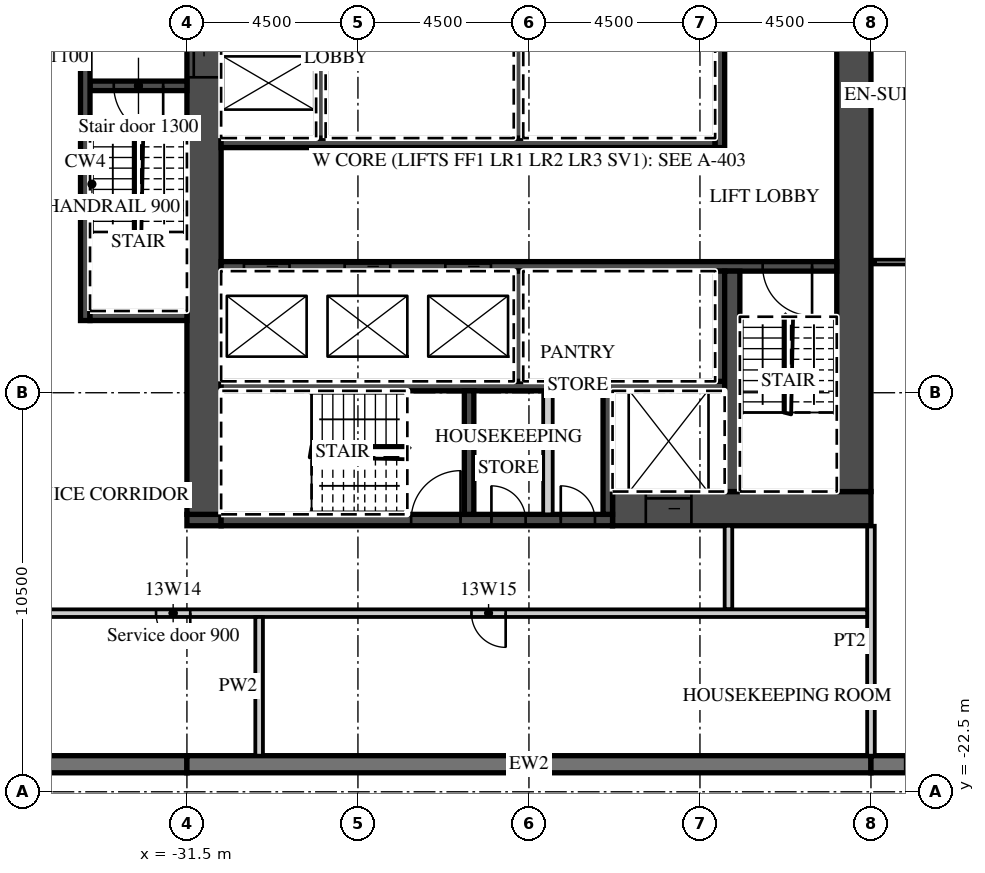
"""IFC4 building model, lengths in metres.
Left out: names, types, materials, properties, quantities, classifications, styles, units other than length and angle.
Written with IfcOpenShell. Run it as: python <this file> out.ifc"""

import sys

from ifc_helpers import new_model, si_unit, direction, frame, frame_2d, origin, place, context, subcontext, project, spatial, rectangle, extrude, element, fill, save


model = new_model("IFC4")
c1 = context("Model", 3, precision=1e-05, world=origin(), true_north=direction((0.0, 1.0)))
c2 = subcontext(c1, "Body", "Model", "MODEL_VIEW")
j1 = project(units=[si_unit("LENGTHUNIT", "METRE"), si_unit("PLANEANGLEUNIT", "RADIAN")], contexts=[c1])
p1 = place(None, origin())
s1 = spatial("IfcSite", under=j1, at=p1, CompositionType="ELEMENT")
p2 = place(p1, origin())
s2 = spatial("IfcBuilding", under=s1, at=p2, CompositionType="ELEMENT")
p3 = place(p2, frame((0.0, 0.0, 73.2)))
s3 = spatial("IfcBuildingStorey", under=s2, at=p3, CompositionType="ELEMENT", Elevation=73.2)
p4 = place(p3, frame((-41.0, -21.775, 0.0), z_axis=(0.0, 0.0, 1.0), x_axis=(1.0, 0.0, 0.0)))
e1 = element("IfcWall", 1, at=p4, inside=s3, PredefinedType="SOLIDWALL", context=c2, shape_type="SweptSolid", body=[
    extrude(rectangle(XDim=9.5, YDim=0.45, at=frame_2d((4.75, 0.0))), origin(), (0.0, 0.0, 1.0), 3.02),
])
p5 = place(p3, frame((-31.5, -21.775, 0.0), z_axis=(0.0, 0.0, 1.0), x_axis=(1.0, 0.0, 0.0)))
e2 = element("IfcWall", 2, at=p5, inside=s3, PredefinedType="SOLIDWALL", context=c2, shape_type="SweptSolid", body=[
    extrude(rectangle(XDim=18.0, YDim=0.45, at=frame_2d((9.0, 0.0))), origin(), (0.0, 0.0, 1.0), 3.02),
])
p6 = place(p3, frame((-13.5, -21.775, 0.0), z_axis=(0.0, 0.0, 1.0), x_axis=(1.0, 0.0, 0.0)))
e3 = element("IfcWall", 3, at=p6, inside=s3, PredefinedType="SOLIDWALL", context=c2, shape_type="SweptSolid", body=[
    extrude(rectangle(XDim=54.5, YDim=0.45, at=frame_2d((27.25, 0.0))), origin(), (0.0, 0.0, 1.0), 3.02),
])
p7 = place(p6, frame((0.9, 0.0, 0.45)))
e4 = element("IfcOpeningElement", 4, at=p7, cuts=e3, PredefinedType="OPENING", context=c2, shape_type="SweptSolid", body=[
    extrude(rectangle(XDim=2.7, YDim=2.25, at=frame_2d((1.35, 1.125))), frame((0.0, 0.235, 0.0), z_axis=(0.0, -1.0, 0.0), x_axis=(1.0, 0.0, 0.0)), (0.0, 0.0, 1.0), 0.47),
])
p8 = place(p6, frame((5.4, 0.0, 0.45)))
e5 = element("IfcOpeningElement", 5, at=p8, cuts=e3, PredefinedType="OPENING", context=c2, shape_type="SweptSolid", body=[
    extrude(rectangle(XDim=2.7, YDim=2.25, at=frame_2d((1.35, 1.125))), frame((0.0, 0.235, 0.0), z_axis=(0.0, -1.0, 0.0), x_axis=(1.0, 0.0, 0.0)), (0.0, 0.0, 1.0), 0.47),
])
p9 = place(p6, frame((9.9, 0.0, 0.45)))
e6 = element("IfcOpeningElement", 6, at=p9, cuts=e3, PredefinedType="OPENING", context=c2, shape_type="SweptSolid", body=[
    extrude(rectangle(XDim=2.7, YDim=2.25, at=frame_2d((1.35, 1.125))), frame((0.0, 0.235, 0.0), z_axis=(0.0, -1.0, 0.0), x_axis=(1.0, 0.0, 0.0)), (0.0, 0.0, 1.0), 0.47),
])
p10 = place(p6, frame((14.4, 0.0, 0.45)))
e7 = element("IfcOpeningElement", 7, at=p10, cuts=e3, PredefinedType="OPENING", context=c2, shape_type="SweptSolid", body=[
    extrude(rectangle(XDim=2.7, YDim=2.25, at=frame_2d((1.35, 1.125))), frame((0.0, 0.235, 0.0), z_axis=(0.0, -1.0, 0.0), x_axis=(1.0, 0.0, 0.0)), (0.0, 0.0, 1.0), 0.47),
])
p11 = place(p6, frame((18.9, 0.0, 0.45)))
e8 = element("IfcOpeningElement", 8, at=p11, cuts=e3, PredefinedType="OPENING", context=c2, shape_type="SweptSolid", body=[
    extrude(rectangle(XDim=2.7, YDim=2.25, at=frame_2d((1.35, 1.125))), frame((0.0, 0.235, 0.0), z_axis=(0.0, -1.0, 0.0), x_axis=(1.0, 0.0, 0.0)), (0.0, 0.0, 1.0), 0.47),
])
p12 = place(p6, frame((23.4, 0.0, 0.45)))
e9 = element("IfcOpeningElement", 9, at=p12, cuts=e3, PredefinedType="OPENING", context=c2, shape_type="SweptSolid", body=[
    extrude(rectangle(XDim=2.7, YDim=2.25, at=frame_2d((1.35, 1.125))), frame((0.0, 0.235, 0.0), z_axis=(0.0, -1.0, 0.0), x_axis=(1.0, 0.0, 0.0)), (0.0, 0.0, 1.0), 0.47),
])
p13 = place(p6, frame((27.9, 0.0, 0.45)))
e10 = element("IfcOpeningElement", 10, at=p13, cuts=e3, PredefinedType="OPENING", context=c2, shape_type="SweptSolid", body=[
    extrude(rectangle(XDim=2.7, YDim=2.25, at=frame_2d((1.35, 1.125))), frame((0.0, 0.235, 0.0), z_axis=(0.0, -1.0, 0.0), x_axis=(1.0, 0.0, 0.0)), (0.0, 0.0, 1.0), 0.47),
])
p14 = place(p6, frame((32.4, 0.0, 0.45)))
e11 = element("IfcOpeningElement", 11, at=p14, cuts=e3, PredefinedType="OPENING", context=c2, shape_type="SweptSolid", body=[
    extrude(rectangle(XDim=2.7, YDim=2.25, at=frame_2d((1.35, 1.125))), frame((0.0, 0.235, 0.0), z_axis=(0.0, -1.0, 0.0), x_axis=(1.0, 0.0, 0.0)), (0.0, 0.0, 1.0), 0.47),
])
p15 = place(p6, frame((36.9, 0.0, 0.45)))
e12 = element("IfcOpeningElement", 12, at=p15, cuts=e3, PredefinedType="OPENING", context=c2, shape_type="SweptSolid", body=[
    extrude(rectangle(XDim=2.7, YDim=2.25, at=frame_2d((1.35, 1.125))), frame((0.0, 0.235, 0.0), z_axis=(0.0, -1.0, 0.0), x_axis=(1.0, 0.0, 0.0)), (0.0, 0.0, 1.0), 0.47),
])
p16 = place(p6, frame((41.4, 0.0, 0.45)))
e13 = element("IfcOpeningElement", 13, at=p16, cuts=e3, PredefinedType="OPENING", context=c2, shape_type="SweptSolid", body=[
    extrude(rectangle(XDim=2.7, YDim=2.25, at=frame_2d((1.35, 1.125))), frame((0.0, 0.235, 0.0), z_axis=(0.0, -1.0, 0.0), x_axis=(1.0, 0.0, 0.0)), (0.0, 0.0, 1.0), 0.47),
])
p17 = place(p6, frame((45.9, 0.0, 0.45)))
e14 = element("IfcOpeningElement", 14, at=p17, cuts=e3, PredefinedType="OPENING", context=c2, shape_type="SweptSolid", body=[
    extrude(rectangle(XDim=2.7, YDim=2.25, at=frame_2d((1.35, 1.125))), frame((0.0, 0.235, 0.0), z_axis=(0.0, -1.0, 0.0), x_axis=(1.0, 0.0, 0.0)), (0.0, 0.0, 1.0), 0.47),
])
p18 = place(p6, frame((50.4, 0.0, 0.45)))
e15 = element("IfcOpeningElement", 15, at=p18, cuts=e3, PredefinedType="OPENING", context=c2, shape_type="SweptSolid", body=[
    extrude(rectangle(XDim=2.7, YDim=2.25, at=frame_2d((1.35, 1.125))), frame((0.0, 0.235, 0.0), z_axis=(0.0, -1.0, 0.0), x_axis=(1.0, 0.0, 0.0)), (0.0, 0.0, 1.0), 0.47),
])
p19 = place(p3, frame((-13.5, -21.55, 0.0), z_axis=(0.0, 0.0, 1.0), x_axis=(0.0, 1.0, 0.0)))
e16 = element("IfcWall", 16, at=p19, inside=s3, PredefinedType="PARTITIONING", context=c2, shape_type="SweptSolid", body=[
    extrude(rectangle(XDim=6.05, YDim=0.2, at=frame_2d((3.025, 0.0))), origin(), (0.0, 0.0, 1.0), 3.02),
])
p20 = place(p3, frame((-13.4, -8.562, 0.0), z_axis=(0.0, 0.0, 1.0), x_axis=(1.0, 0.0, 0.0)))
e17 = element("IfcWall", 17, at=p20, inside=s3, PredefinedType="PARTITIONING", context=c2, shape_type="SweptSolid", body=[
    extrude(rectangle(XDim=2.25, YDim=0.125, at=frame_2d((1.125, 0.0))), origin(), (0.0, 0.0, 1.0), 3.02),
])
p21 = place(p3, frame((-20.3, -15.05, 0.0), z_axis=(0.0, 0.0, 1.0), x_axis=(1.0, 0.0, 0.0)))
e18 = element("IfcWall", 18, at=p21, inside=s3, PredefinedType="SHEAR", context=c2, shape_type="SweptSolid", body=[
    extrude(rectangle(XDim=6.8, YDim=0.9, at=frame_2d((3.4, 0.0))), origin(), (0.0, 0.0, 1.0), 3.02),
])
p22 = place(p21, frame((0.875, 0.0, 0.0)))
e19 = element("IfcOpeningElement", 19, at=p22, cuts=e18, PredefinedType="OPENING", context=c2, shape_type="SweptSolid", body=[
    extrude(rectangle(XDim=1.2, YDim=2.1, at=frame_2d((0.6, 1.05))), frame((0.0, 0.46, 0.0), z_axis=(0.0, -1.0, 0.0), x_axis=(1.0, 0.0, 0.0)), (0.0, 0.0, 1.0), 0.92),
])
p23 = place(p3, frame((-31.5, -15.35, 0.0), z_axis=(0.0, 0.0, 1.0), x_axis=(1.0, 0.0, 0.0)))
e20 = element("IfcWall", 20, at=p23, inside=s3, PredefinedType="SHEAR", context=c2, shape_type="SweptSolid", body=[
    extrude(rectangle(XDim=0.9, YDim=0.3, at=frame_2d((0.45, 0.0))), origin(), (0.0, 0.0, 1.0), 3.02),
])
p24 = place(p3, frame((-30.6, -15.35, 0.0), z_axis=(0.0, 0.0, 1.0), x_axis=(1.0, 0.0, 0.0)))
e21 = element("IfcWall", 21, at=p24, inside=s3, PredefinedType="SHEAR", context=c2, shape_type="SweptSolid", body=[
    extrude(rectangle(XDim=10.3, YDim=0.3, at=frame_2d((5.15, 0.0))), origin(), (0.0, 0.0, 1.0), 3.02),
])
p25 = place(p24, frame((5.0, 0.0, 0.0)))
e22 = element("IfcOpeningElement", 22, at=p25, cuts=e21, PredefinedType="OPENING", context=c2, shape_type="SweptSolid", body=[
    extrude(rectangle(XDim=1.3, YDim=2.1, at=frame_2d((0.65, 1.05))), frame((0.0, 0.16, 0.0), z_axis=(0.0, -1.0, 0.0), x_axis=(1.0, 0.0, 0.0)), (0.0, 0.0, 1.0), 0.32),
])
p26 = place(p24, frame((7.113, 0.0, 0.0)))
e23 = element("IfcOpeningElement", 23, at=p26, cuts=e21, PredefinedType="OPENING", context=c2, shape_type="SweptSolid", body=[
    extrude(rectangle(XDim=0.9, YDim=2.1, at=frame_2d((0.45, 1.05))), frame((0.0, 0.16, 0.0), z_axis=(0.0, -1.0, 0.0), x_axis=(1.0, 0.0, 0.0)), (0.0, 0.0, 1.0), 0.32),
])
p27 = place(p24, frame((8.938, 0.0, 0.0)))
e24 = element("IfcOpeningElement", 24, at=p27, cuts=e21, PredefinedType="OPENING", context=c2, shape_type="SweptSolid", body=[
    extrude(rectangle(XDim=0.9, YDim=2.1, at=frame_2d((0.45, 1.05))), frame((0.0, 0.16, 0.0), z_axis=(0.0, -1.0, 0.0), x_axis=(1.0, 0.0, 0.0)), (0.0, 0.0, 1.0), 0.32),
])
p28 = place(p3, frame((-31.05, -15.2, 0.0), z_axis=(0.0, 0.0, 1.0), x_axis=(0.0, 1.0, 0.0)))
e25 = element("IfcWall", 25, at=p28, inside=s3, PredefinedType="SHEAR", context=c2, shape_type="SweptSolid", body=[
    extrude(rectangle(XDim=12.8, YDim=0.9, at=frame_2d((6.4, 0.0))), origin(), (0.0, 0.0, 1.0), 3.02),
])
p29 = place(p28, frame((11.5, 0.0, 0.0)))
e26 = element("IfcOpeningElement", 26, at=p29, cuts=e25, PredefinedType="OPENING", context=c2, shape_type="SweptSolid", body=[
    extrude(rectangle(XDim=1.1, YDim=2.1, at=frame_2d((0.55, 1.05))), frame((0.0, 0.46, 0.0), z_axis=(0.0, -1.0, 0.0), x_axis=(1.0, 0.0, 0.0)), (0.0, 0.0, 1.0), 0.92),
])
p30 = place(p3, frame((-13.95, -14.6, 0.0), z_axis=(0.0, 0.0, 1.0), x_axis=(0.0, 1.0, 0.0)))
e27 = element("IfcWall", 27, at=p30, inside=s3, PredefinedType="SHEAR", context=c2, shape_type="SweptSolid", body=[
    extrude(rectangle(XDim=12.2, YDim=0.9, at=frame_2d((6.1, 0.0))), origin(), (0.0, 0.0, 1.0), 3.02),
])
p31 = place(p3, frame((-30.6, -5.425, 0.0), z_axis=(0.0, 0.0, 1.0), x_axis=(1.0, 0.0, 0.0)))
e28 = element("IfcWall", 28, at=p31, inside=s3, PredefinedType="SHEAR", context=c2, shape_type="SweptSolid", body=[
    extrude(rectangle(XDim=13.0, YDim=0.25, at=frame_2d((6.5, 0.0))), origin(), (0.0, 0.0, 1.0), 3.02),
])
p32 = place(p3, frame((-17.475, -5.55, 0.0), z_axis=(0.0, 0.0, 1.0), x_axis=(0.0, 1.0, 0.0)))
e29 = element("IfcWall", 29, at=p32, inside=s3, PredefinedType="SHEAR", context=c2, shape_type="SweptSolid", body=[
    extrude(rectangle(XDim=3.15, YDim=0.25, at=frame_2d((1.575, 0.0))), origin(), (0.0, 0.0, 1.0), 3.02),
])
for number, where, z_axis, x_axis in (
    (30, (-27.975, -5.3, 0.0), (0.0, 0.0, 1.0), (0.0, 1.0, 0.0)),
    (31, (-22.775, -5.3, 0.0), (0.0, 0.0, 1.0), (0.0, 1.0, 0.0)),
):
    element("IfcWall", number, at=place(p3, frame(where, z_axis=z_axis, x_axis=x_axis)), inside=s3, PredefinedType="SHEAR", context=c2, shape_type="SweptSolid", body=[
        extrude(rectangle(XDim=2.9, YDim=0.25, at=frame_2d((1.45, 0.0))), origin(), (0.0, 0.0, 1.0), 3.02),
    ])
p33 = place(p3, frame((-30.6, -8.675, 0.0), z_axis=(0.0, 0.0, 1.0), x_axis=(1.0, 0.0, 0.0)))
e32 = element("IfcWall", 32, at=p33, inside=s3, PredefinedType="SHEAR", context=c2, shape_type="SweptSolid", body=[
    extrude(rectangle(XDim=16.2, YDim=0.25, at=frame_2d((8.1, 0.0))), origin(), (0.0, 0.0, 1.0), 3.02),
])
p34 = place(p33, frame((0.6, 0.0, 0.0)))
e33 = element("IfcOpeningElement", 33, at=p34, cuts=e32, PredefinedType="OPENING", context=c2, shape_type="SweptSolid", body=[
    extrude(rectangle(XDim=1.2, YDim=2.1, at=frame_2d((0.6, 1.05))), frame((0.0, 0.135, 0.0), z_axis=(0.0, -1.0, 0.0), x_axis=(1.0, 0.0, 0.0)), (0.0, 0.0, 1.0), 0.27),
])
p35 = place(p33, frame((3.25, 0.0, 0.0)))
e34 = element("IfcOpeningElement", 34, at=p35, cuts=e32, PredefinedType="OPENING", context=c2, shape_type="SweptSolid", body=[
    extrude(rectangle(XDim=1.2, YDim=2.1, at=frame_2d((0.6, 1.05))), frame((0.0, 0.135, 0.0), z_axis=(0.0, -1.0, 0.0), x_axis=(1.0, 0.0, 0.0)), (0.0, 0.0, 1.0), 0.27),
])
p36 = place(p33, frame((5.9, 0.0, 0.0)))
e35 = element("IfcOpeningElement", 35, at=p36, cuts=e32, PredefinedType="OPENING", context=c2, shape_type="SweptSolid", body=[
    extrude(rectangle(XDim=1.2, YDim=2.1, at=frame_2d((0.6, 1.05))), frame((0.0, 0.135, 0.0), z_axis=(0.0, -1.0, 0.0), x_axis=(1.0, 0.0, 0.0)), (0.0, 0.0, 1.0), 0.27),
])
p37 = place(p33, frame((14.25, 0.0, 0.0)))
e36 = element("IfcOpeningElement", 36, at=p37, cuts=e32, PredefinedType="OPENING", context=c2, shape_type="SweptSolid", body=[
    extrude(rectangle(XDim=1.3, YDim=2.1, at=frame_2d((0.65, 1.05))), frame((0.0, 0.135, 0.0), z_axis=(0.0, -1.0, 0.0), x_axis=(1.0, 0.0, 0.0)), (0.0, 0.0, 1.0), 0.27),
])
p38 = place(p3, frame((-30.6, -11.825, 0.0), z_axis=(0.0, 0.0, 1.0), x_axis=(1.0, 0.0, 0.0)))
e37 = element("IfcWall", 37, at=p38, inside=s3, PredefinedType="SHEAR", context=c2, shape_type="SweptSolid", body=[
    extrude(rectangle(XDim=13.25, YDim=0.25, at=frame_2d((6.625, 0.0))), origin(), (0.0, 0.0, 1.0), 3.02),
])
for number, where, z_axis, x_axis in (
    (38, (-17.475, -11.7, 0.0), (0.0, 0.0, 1.0), (0.0, 1.0, 0.0)),
    (39, (-22.775, -11.7, 0.0), (0.0, 0.0, 1.0), (0.0, 1.0, 0.0)),
):
    element("IfcWall", number, at=place(p3, frame(where, z_axis=z_axis, x_axis=x_axis)), inside=s3, PredefinedType="SHEAR", context=c2, shape_type="SweptSolid", body=[
        extrude(rectangle(XDim=2.9, YDim=0.25, at=frame_2d((1.45, 0.0))), origin(), (0.0, 0.0, 1.0), 3.02),
    ])
p39 = place(p3, frame((-17.15, -14.6, 0.0), z_axis=(0.0, 0.0, 1.0), x_axis=(0.0, 1.0, 0.0)))
e40 = element("IfcWall", 40, at=p39, inside=s3, PredefinedType="SHEAR", context=c2, shape_type="SweptSolid", body=[
    extrude(rectangle(XDim=5.8, YDim=0.4, at=frame_2d((2.9, 0.0))), origin(), (0.0, 0.0, 1.0), 3.02),
])
for number, where, z_axis, x_axis in (
    (41, (-20.425, -15.2, 0.0), (0.0, 0.0, 1.0), (0.0, 1.0, 0.0)),
    (42, (-24.075, -15.2, 0.0), (0.0, 0.0, 1.0), (0.0, 1.0, 0.0)),
):
    element("IfcWall", number, at=place(p3, frame(where, z_axis=z_axis, x_axis=x_axis)), inside=s3, PredefinedType="SHEAR", context=c2, shape_type="SweptSolid", body=[
        extrude(rectangle(XDim=3.25, YDim=0.25, at=frame_2d((1.625, 0.0))), origin(), (0.0, 0.0, 1.0), 3.02),
    ])
p40 = place(p3, frame((-22.0, -15.2, 0.0), z_axis=(0.0, 0.0, 1.0), x_axis=(0.0, 1.0, 0.0)))
e43 = element("IfcWall", 43, at=p40, inside=s3, PredefinedType="PARTITIONING", context=c2, shape_type="SweptSolid", body=[
    extrude(rectangle(XDim=3.25, YDim=0.25, at=frame_2d((1.625, 0.0))), origin(), (0.0, 0.0, 1.0), 3.02),
])
p41 = place(p3, frame((-34.05, -3.925, 0.0), z_axis=(0.0, 0.0, 1.0), x_axis=(1.0, 0.0, 0.0)))
e44 = element("IfcWall", 44, at=p41, inside=s3, PredefinedType="SHEAR", context=c2, shape_type="SweptSolid", body=[
    extrude(rectangle(XDim=2.55, YDim=0.25, at=frame_2d((1.275, 0.0))), origin(), (0.0, 0.0, 1.0), 3.02),
])
p42 = place(p41, frame((0.625, 0.0, 0.0)))
e45 = element("IfcOpeningElement", 45, at=p42, cuts=e44, PredefinedType="OPENING", context=c2, shape_type="SweptSolid", body=[
    extrude(rectangle(XDim=1.3, YDim=2.1, at=frame_2d((0.65, 1.05))), frame((0.0, 0.135, 0.0), z_axis=(0.0, -1.0, 0.0), x_axis=(1.0, 0.0, 0.0)), (0.0, 0.0, 1.0), 0.27),
])
p43 = place(p3, frame((-34.175, -10.1, 0.0), z_axis=(0.0, 0.0, 1.0), x_axis=(0.0, 1.0, 0.0)))
e46 = element("IfcWall", 46, at=p43, inside=s3, PredefinedType="SHEAR", context=c2, shape_type="SweptSolid", body=[
    extrude(rectangle(XDim=8.35, YDim=0.25, at=frame_2d((4.175, 0.0))), origin(), (0.0, 0.0, 1.0), 3.02),
])
p44 = place(p3, frame((-34.05, -9.975, 0.0), z_axis=(0.0, 0.0, 1.0), x_axis=(1.0, 0.0, 0.0)))
e47 = element("IfcWall", 47, at=p44, inside=s3, PredefinedType="SHEAR", context=c2, shape_type="SweptSolid", body=[
    extrude(rectangle(XDim=2.55, YDim=0.25, at=frame_2d((1.275, 0.0))), origin(), (0.0, 0.0, 1.0), 3.02),
])
p45 = place(p3, frame((-17.25, -17.7, 0.0), z_axis=(0.0, 0.0, 1.0), x_axis=(0.0, 1.0, 0.0)))
e48 = element("IfcWall", 48, at=p45, inside=s3, PredefinedType="PARTITIONING", context=c2, shape_type="SweptSolid", body=[
    extrude(rectangle(XDim=2.2, YDim=0.2, at=frame_2d((1.1, 0.0))), origin(), (0.0, 0.0, 1.0), 3.02),
])
p46 = place(p3, frame((-44.55, -17.8, 0.0), z_axis=(0.0, 0.0, 1.0), x_axis=(1.0, 0.0, 0.0)))
e49 = element("IfcWall", 49, at=p46, inside=s3, PredefinedType="PARTITIONING", context=c2, shape_type="SweptSolid", body=[
    extrude(rectangle(XDim=30.95, YDim=0.2, at=frame_2d((15.475, 0.0))), origin(), (0.0, 0.0, 1.0), 3.02),
])
p47 = place(p46, frame((12.238, 0.0, 0.0)))
e50 = element("IfcOpeningElement", 50, at=p47, cuts=e49, PredefinedType="OPENING", context=c2, shape_type="SweptSolid", body=[
    extrude(rectangle(XDim=0.9, YDim=2.1, at=frame_2d((0.45, 1.05))), frame((0.0, 0.11, 0.0), z_axis=(0.0, -1.0, 0.0), x_axis=(1.0, 0.0, 0.0)), (0.0, 0.0, 1.0), 0.22),
])
p48 = place(p46, frame((20.538, 0.0, 0.0)))
e51 = element("IfcOpeningElement", 51, at=p48, cuts=e49, PredefinedType="OPENING", context=c2, shape_type="SweptSolid", body=[
    extrude(rectangle(XDim=0.9, YDim=2.1, at=frame_2d((0.45, 1.05))), frame((0.0, 0.11, 0.0), z_axis=(0.0, -1.0, 0.0), x_axis=(1.0, 0.0, 0.0)), (0.0, 0.0, 1.0), 0.22),
])
p49 = place(p3, frame((-29.6, -21.55, 0.0), z_axis=(0.0, 0.0, 1.0), x_axis=(0.0, 1.0, 0.0)))
e52 = element("IfcWall", 52, at=p49, inside=s3, PredefinedType="PARTITIONING", context=c2, shape_type="SweptSolid", body=[
    extrude(rectangle(XDim=3.65, YDim=0.2, at=frame_2d((1.825, 0.0))), origin(), (0.0, 0.0, 1.0), 3.02),
])
p50 = place(p34, origin())
e53 = element("IfcDoor", 53, at=p50, inside=s3, OperationType="SLIDING_TO_LEFT", PredefinedType="DOOR", context=c2, shape_type="SweptSolid", body=[
    extrude(rectangle(XDim=1.2, YDim=2.1, at=frame_2d((0.6, 1.05))), frame((0.0, 0.025, 0.0), z_axis=(0.0, -1.0, 0.0), x_axis=(1.0, 0.0, 0.0)), (0.0, 0.0, 1.0), 0.05),
])
fill(e33, e53)
p51 = place(p35, origin())
e54 = element("IfcDoor", 54, at=p51, inside=s3, OperationType="SLIDING_TO_RIGHT", PredefinedType="DOOR", context=c2, shape_type="SweptSolid", body=[
    extrude(rectangle(XDim=1.2, YDim=2.1, at=frame_2d((0.6, 1.05))), frame((0.0, 0.025, 0.0), z_axis=(0.0, -1.0, 0.0), x_axis=(1.0, 0.0, 0.0)), (0.0, 0.0, 1.0), 0.05),
])
fill(e34, e54)
p52 = place(p36, origin())
e55 = element("IfcDoor", 55, at=p52, inside=s3, OperationType="SLIDING_TO_RIGHT", PredefinedType="DOOR", context=c2, shape_type="SweptSolid", body=[
    extrude(rectangle(XDim=1.2, YDim=2.1, at=frame_2d((0.6, 1.05))), frame((0.0, 0.025, 0.0), z_axis=(0.0, -1.0, 0.0), x_axis=(1.0, 0.0, 0.0)), (0.0, 0.0, 1.0), 0.05),
])
fill(e35, e55)
p53 = place(p22, origin())
e56 = element("IfcDoor", 56, at=p53, inside=s3, OperationType="SLIDING_TO_LEFT", PredefinedType="DOOR", context=c2, shape_type="SweptSolid", body=[
    extrude(rectangle(XDim=1.2, YDim=2.1, at=frame_2d((0.6, 1.05))), frame((0.0, 0.025, 0.0), z_axis=(0.0, -1.0, 0.0), x_axis=(1.0, 0.0, 0.0)), (0.0, 0.0, 1.0), 0.05),
])
fill(e19, e56)
p54 = place(p29, origin())
e57 = element("IfcDoor", 57, at=p54, inside=s3, OperationType="SLIDING_TO_RIGHT", PredefinedType="DOOR", context=c2, shape_type="SweptSolid", body=[
    extrude(rectangle(XDim=1.1, YDim=2.1, at=frame_2d((0.55, 1.05))), frame((0.0, 0.025, 0.0), z_axis=(0.0, -1.0, 0.0), x_axis=(1.0, 0.0, 0.0)), (0.0, 0.0, 1.0), 0.05),
])
fill(e26, e57)
p55 = place(p42, origin())
e58 = element("IfcDoor", 58, at=p55, inside=s3, OperationType="SINGLE_SWING_RIGHT", PredefinedType="DOOR", context=c2, shape_type="SweptSolid", body=[
    extrude(rectangle(XDim=1.3, YDim=2.1, at=frame_2d((0.65, 1.05))), frame((0.0, 0.025, 0.0), z_axis=(0.0, -1.0, 0.0), x_axis=(1.0, 0.0, 0.0)), (0.0, 0.0, 1.0), 0.05),
])
fill(e45, e58)
p56 = place(p37, origin())
e59 = element("IfcDoor", 59, at=p56, inside=s3, OperationType="SINGLE_SWING_RIGHT", PredefinedType="DOOR", context=c2, shape_type="SweptSolid", body=[
    extrude(rectangle(XDim=1.3, YDim=2.1, at=frame_2d((0.65, 1.05))), frame((0.0, 0.025, 0.0), z_axis=(0.0, -1.0, 0.0), x_axis=(1.0, 0.0, 0.0)), (0.0, 0.0, 1.0), 0.05),
])
fill(e36, e59)
p57 = place(p25, origin())
e60 = element("IfcDoor", 60, at=p57, inside=s3, OperationType="SINGLE_SWING_RIGHT", PredefinedType="DOOR", context=c2, shape_type="SweptSolid", body=[
    extrude(rectangle(XDim=1.3, YDim=2.1, at=frame_2d((0.65, 1.05))), frame((0.0, 0.025, 0.0), z_axis=(0.0, -1.0, 0.0), x_axis=(1.0, 0.0, 0.0)), (0.0, 0.0, 1.0), 0.05),
])
fill(e22, e60)
p58 = place(p26, origin())
e61 = element("IfcDoor", 61, at=p58, inside=s3, OperationType="SINGLE_SWING_LEFT", PredefinedType="DOOR", context=c2, shape_type="SweptSolid", body=[
    extrude(rectangle(XDim=0.9, YDim=2.1, at=frame_2d((0.45, 1.05))), frame((0.0, 0.025, 0.0), z_axis=(0.0, -1.0, 0.0), x_axis=(1.0, 0.0, 0.0)), (0.0, 0.0, 1.0), 0.05),
])
fill(e23, e61)
p59 = place(p27, origin())
e62 = element("IfcDoor", 62, at=p59, inside=s3, OperationType="SINGLE_SWING_LEFT", PredefinedType="DOOR", context=c2, shape_type="SweptSolid", body=[
    extrude(rectangle(XDim=0.9, YDim=2.1, at=frame_2d((0.45, 1.05))), frame((0.0, 0.025, 0.0), z_axis=(0.0, -1.0, 0.0), x_axis=(1.0, 0.0, 0.0)), (0.0, 0.0, 1.0), 0.05),
])
fill(e24, e62)
p60 = place(p47, origin())
e63 = element("IfcDoor", 63, at=p60, inside=s3, OperationType="SINGLE_SWING_RIGHT", PredefinedType="DOOR", context=c2, shape_type="SweptSolid", body=[
    extrude(rectangle(XDim=0.9, YDim=2.1, at=frame_2d((0.45, 1.05))), frame((0.0, 0.025, 0.0), z_axis=(0.0, -1.0, 0.0), x_axis=(1.0, 0.0, 0.0)), (0.0, 0.0, 1.0), 0.05),
])
fill(e50, e63)
p61 = place(p48, origin())
e64 = element("IfcDoor", 64, at=p61, inside=s3, OperationType="SINGLE_SWING_RIGHT", PredefinedType="DOOR", context=c2, shape_type="SweptSolid", body=[
    extrude(rectangle(XDim=0.9, YDim=2.1, at=frame_2d((0.45, 1.05))), frame((0.0, 0.025, 0.0), z_axis=(0.0, -1.0, 0.0), x_axis=(1.0, 0.0, 0.0)), (0.0, 0.0, 1.0), 0.05),
])
fill(e51, e64)
save(model, sys.argv[1])
